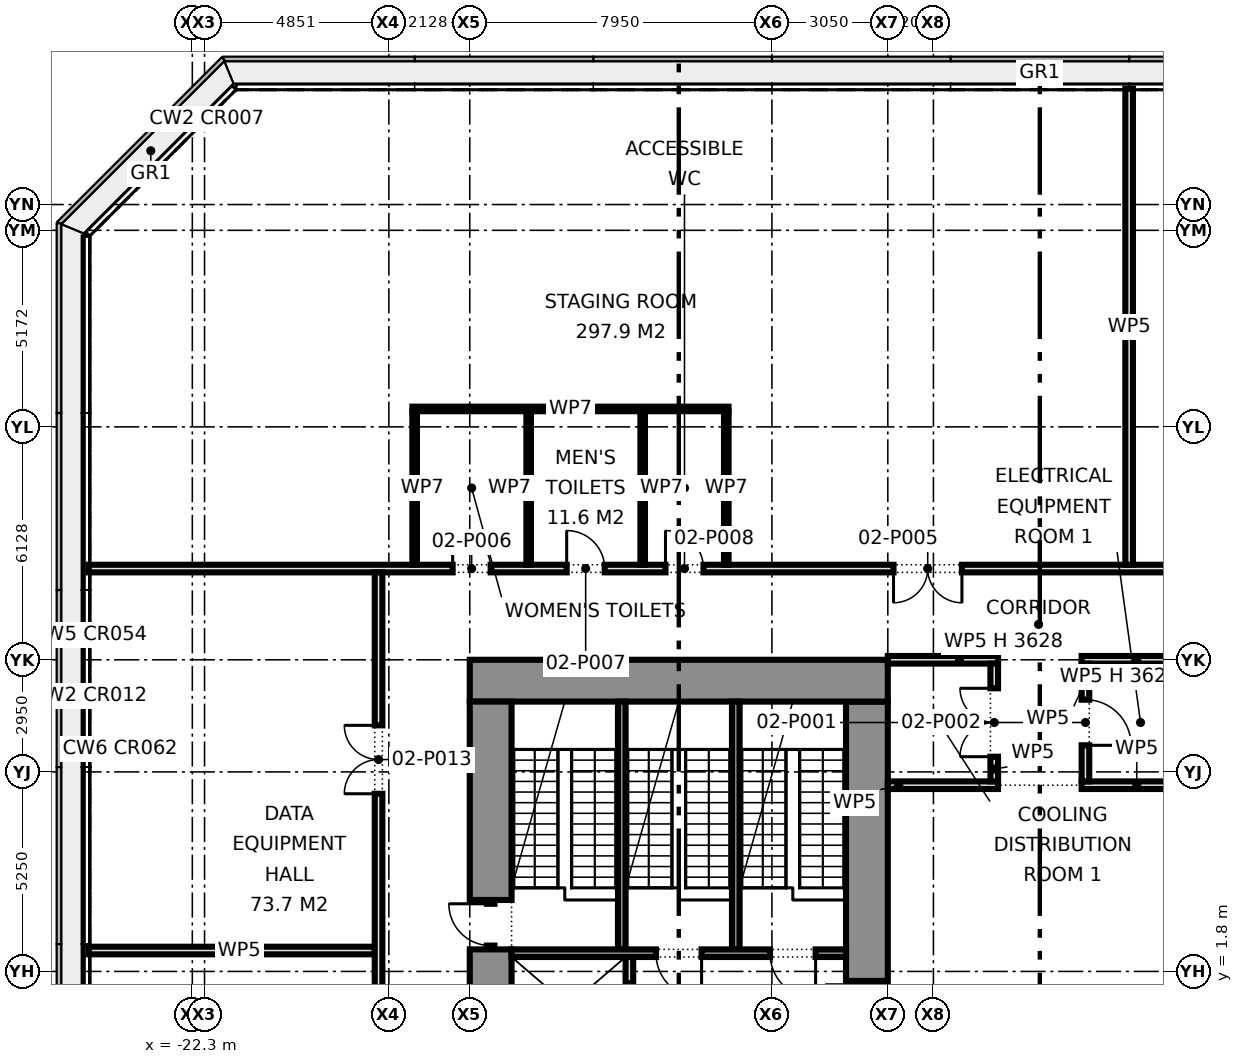
"""IFC4 building model, lengths in metres.
Left out: names, types, materials, properties, quantities, classifications, styles, units other than length and angle.
Written with IfcOpenShell. Run it as: python <this file> out.ifc"""

import sys

from ifc_helpers import new_model, si_unit, direction, frame, frame_2d, origin, place, context, subcontext, project, spatial, rectangle, extrude, element, fill, save


model = new_model("IFC4")
c1 = context("Model", 3, precision=1e-05, world=origin(), true_north=direction((0.0, 1.0)))
c2 = subcontext(c1, "Body", "Model", "MODEL_VIEW")
j1 = project(units=[si_unit("LENGTHUNIT", "METRE"), si_unit("PLANEANGLEUNIT", "RADIAN")], contexts=[c1])
p1 = place(None, origin())
s1 = spatial("IfcSite", under=j1, at=p1, CompositionType="ELEMENT")
p2 = place(p1, origin())
s2 = spatial("IfcBuilding", under=s1, at=p2, CompositionType="ELEMENT")
p3 = place(p2, frame((0.0, 0.0, 6.5)))
s3 = spatial("IfcBuildingStorey", under=s2, at=p3, CompositionType="ELEMENT", Elevation=6.5)
p4 = place(p3, frame((-15.0, 9.45, 0.0), z_axis=(0.0, 0.0, 1.0), x_axis=(1.0, 0.0, 0.0)))
e1 = element("IfcWall", 1, at=p4, inside=s3, PredefinedType="SHEAR", context=c2, shape_type="SweptSolid", body=[
    extrude(rectangle(XDim=11.0, YDim=1.1, at=frame_2d((5.5, 0.0))), origin(), (0.0, 0.0, 1.0), 4.575),
])
p5 = place(p3, frame((-14.45, -3.75, 0.0), z_axis=(0.0, 0.0, 1.0), x_axis=(0.0, 1.0, 0.0)))
e2 = element("IfcWall", 2, at=p5, inside=s3, PredefinedType="SHEAR", context=c2, shape_type="SweptSolid", body=[
    extrude(rectangle(XDim=6.13, YDim=1.1, at=frame_2d((3.065, 0.0))), origin(), (0.0, 0.0, 1.0), 4.575),
])
p6 = place(p3, frame((-14.45, 2.38, 0.0), z_axis=(0.0, 0.0, 1.0), x_axis=(0.0, 1.0, 0.0)))
e3 = element("IfcWall", 3, at=p6, inside=s3, PredefinedType="SHEAR", context=c2, shape_type="SweptSolid", body=[
    extrude(rectangle(XDim=1.3, YDim=0.2, at=frame_2d((0.65, 0.0))), origin(), (0.0, 0.0, 1.0), 2.4),
])
p7 = place(p6, frame((0.1, 0.0, 0.0)))
e4 = element("IfcOpeningElement", 4, at=p7, cuts=e3, PredefinedType="OPENING", context=c2, shape_type="SweptSolid", body=[
    extrude(rectangle(XDim=1.1, YDim=2.1, at=frame_2d((0.55, 1.05))), frame((0.0, 0.11, 0.0), z_axis=(0.0, -1.0, 0.0), x_axis=(1.0, 0.0, 0.0)), (0.0, 0.0, 1.0), 0.22),
])
p8 = place(p3, frame((-14.45, 3.68, 0.0), z_axis=(0.0, 0.0, 1.0), x_axis=(0.0, 1.0, 0.0)))
e5 = element("IfcWall", 5, at=p8, inside=s3, PredefinedType="SHEAR", context=c2, shape_type="SweptSolid", body=[
    extrude(rectangle(XDim=5.22, YDim=1.1, at=frame_2d((2.61, 0.0))), origin(), (0.0, 0.0, 1.0), 4.575),
])
p9 = place(p3, frame((-4.55, 0.25, 0.0), z_axis=(0.0, 0.0, 1.0), x_axis=(0.0, 1.0, 0.0)))
e6 = element("IfcWall", 6, at=p9, inside=s3, PredefinedType="PARTITIONING", context=c2, shape_type="SweptSolid", body=[
    extrude(rectangle(XDim=1.3, YDim=0.2, at=frame_2d((0.65, 0.0))), origin(), (0.0, 0.0, 1.0), 2.4),
])
p10 = place(p9, frame((0.1, 0.0, 0.0)))
e7 = element("IfcOpeningElement", 7, at=p10, cuts=e6, PredefinedType="OPENING", context=c2, shape_type="SweptSolid", body=[
    extrude(rectangle(XDim=1.1, YDim=2.1, at=frame_2d((0.55, 1.05))), frame((0.0, 0.11, 0.0), z_axis=(0.0, -1.0, 0.0), x_axis=(1.0, 0.0, 0.0)), (0.0, 0.0, 1.0), 0.22),
])
p11 = place(p3, frame((-4.55, 1.55, 0.0), z_axis=(0.0, 0.0, 1.0), x_axis=(0.0, 1.0, 0.0)))
e8 = element("IfcWall", 8, at=p11, inside=s3, PredefinedType="SHEAR", context=c2, shape_type="SweptSolid", body=[
    extrude(rectangle(XDim=7.35, YDim=1.1, at=frame_2d((3.675, 0.0))), origin(), (0.0, 0.0, 1.0), 4.575),
])
p12 = place(p3, frame((-10.8, -0.4, 0.0), z_axis=(0.0, 0.0, 1.0), x_axis=(0.0, 1.0, 0.0)))
e9 = element("IfcWall", 9, at=p12, inside=s3, PredefinedType="PARTITIONING", context=c2, shape_type="SweptSolid", body=[
    extrude(rectangle(XDim=2.58, YDim=0.2, at=frame_2d((1.29, 0.0))), origin(), (0.0, 0.0, 1.0), 4.575),
])
p13 = place(p12, frame((0.69, 0.0, 0.0)))
e10 = element("IfcOpeningElement", 10, at=p13, cuts=e9, PredefinedType="OPENING", context=c2, shape_type="SweptSolid", body=[
    extrude(rectangle(XDim=1.2, YDim=2.1, at=frame_2d((0.6, 1.05))), frame((0.0, 0.11, 0.0), z_axis=(0.0, -1.0, 0.0), x_axis=(1.0, 0.0, 0.0)), (0.0, 0.0, 1.0), 0.22),
])
p14 = place(p3, frame((-13.9, 2.28, 0.0), z_axis=(0.0, 0.0, 1.0), x_axis=(1.0, 0.0, 0.0)))
e11 = element("IfcWall", 11, at=p14, inside=s3, PredefinedType="SHEAR", context=c2, shape_type="SweptSolid", body=[
    extrude(rectangle(XDim=8.8, YDim=0.2, at=frame_2d((4.4, 0.0))), origin(), (0.0, 0.0, 1.0), 4.575),
])
p15 = place(p14, frame((3.8, 0.0, 0.0)))
e12 = element("IfcOpeningElement", 12, at=p15, cuts=e11, PredefinedType="OPENING", context=c2, shape_type="SweptSolid", body=[
    extrude(rectangle(XDim=1.2, YDim=2.1, at=frame_2d((0.6, 1.05))), frame((0.0, 0.11, 0.0), z_axis=(0.0, -1.0, 0.0), x_axis=(1.0, 0.0, 0.0)), (0.0, 0.0, 1.0), 0.22),
])
p16 = place(p14, frame((6.8, 0.0, 0.0)))
e13 = element("IfcOpeningElement", 13, at=p16, cuts=e11, PredefinedType="OPENING", context=c2, shape_type="SweptSolid", body=[
    extrude(rectangle(XDim=1.2, YDim=2.1, at=frame_2d((0.6, 1.05))), frame((0.0, 0.11, 0.0), z_axis=(0.0, -1.0, 0.0), x_axis=(1.0, 0.0, 0.0)), (0.0, 0.0, 1.0), 0.22),
])
for number, where, z_axis, x_axis in (
    (14, (-11.0, 2.38, 0.0), (0.0, 0.0, 1.0), (0.0, 1.0, 0.0)),
    (15, (-8.0, 2.38, 0.0), (0.0, 0.0, 1.0), (0.0, 1.0, 0.0)),
):
    element("IfcWall", number, at=place(p3, frame(where, z_axis=z_axis, x_axis=x_axis)), inside=s3, PredefinedType="SHEAR", context=c2, shape_type="SweptSolid", body=[
        extrude(rectangle(XDim=6.52, YDim=0.2, at=frame_2d((3.26, 0.0))), origin(), (0.0, 0.0, 1.0), 4.575),
    ])
p17 = place(p3, frame((-25.03, 2.35, 0.0), z_axis=(0.0, 0.0, 1.0), x_axis=(1.0, 0.0, 0.0)))
e16 = element("IfcWall", 16, at=p17, inside=s3, PredefinedType="PARTITIONING", context=c2, shape_type="SweptSolid", body=[
    extrude(rectangle(XDim=7.53, YDim=0.2, at=frame_2d((3.765, 0.0))), origin(), (0.0, 0.0, 1.0), 4.575),
])
for number, where, z_axis, x_axis in (
    (17, (-4.0, 6.7, 0.0), (0.0, 0.0, 1.0), (1.0, 0.0, 0.0)),
    (18, (1.1, 6.7, 0.0), (0.0, 0.0, 1.0), (1.0, 0.0, 0.0)),
):
    element("IfcWall", number, at=place(p3, frame(where, z_axis=z_axis, x_axis=x_axis)), inside=s3, PredefinedType="PARTITIONING", context=c2, shape_type="SweptSolid", body=[
        extrude(rectangle(XDim=2.9, YDim=0.2, at=frame_2d((1.45, 0.0))), origin(), (0.0, 0.0, 1.0), 4.575),
    ])
for number, where, z_axis, x_axis in (
    (19, (-4.0, 10.0, 0.0), (0.0, 0.0, 1.0), (1.0, 0.0, 0.0)),
    (20, (1.1, 10.0, 0.0), (0.0, 0.0, 1.0), (1.0, 0.0, 0.0)),
):
    element("IfcWall", number, at=place(p3, frame(where, z_axis=z_axis, x_axis=x_axis)), inside=s3, PredefinedType="PARTITIONING", context=c2, shape_type="SweptSolid", body=[
        extrude(rectangle(XDim=2.9, YDim=0.2, at=frame_2d((1.45, 0.0))), origin(), (0.0, 0.0, 1.0), 3.628),
    ])
p18 = place(p3, frame((-25.03, 12.4, 0.0), z_axis=(0.0, 0.0, 1.0), x_axis=(1.0, 0.0, 0.0)))
e21 = element("IfcWall", 21, at=p18, inside=s3, PredefinedType="PARTITIONING", context=c2, shape_type="SweptSolid", body=[
    extrude(rectangle(XDim=50.06, YDim=0.2, at=frame_2d((25.03, 0.0))), origin(), (0.0, 0.0, 1.0), 4.575),
])
p19 = place(p18, frame((21.18, 0.0, 0.0)))
e22 = element("IfcOpeningElement", 22, at=p19, cuts=e21, PredefinedType="OPENING", context=c2, shape_type="SweptSolid", body=[
    extrude(rectangle(XDim=1.8, YDim=2.1, at=frame_2d((0.9, 1.05))), frame((0.0, 0.11, 0.0), z_axis=(0.0, -1.0, 0.0), x_axis=(1.0, 0.0, 0.0)), (0.0, 0.0, 1.0), 0.22),
])
p20 = place(p18, frame((9.58, 0.0, 0.0)))
e23 = element("IfcOpeningElement", 23, at=p20, cuts=e21, PredefinedType="OPENING", context=c2, shape_type="SweptSolid", body=[
    extrude(rectangle(XDim=1.0, YDim=2.1, at=frame_2d((0.5, 1.05))), frame((0.0, 0.11, 0.0), z_axis=(0.0, -1.0, 0.0), x_axis=(1.0, 0.0, 0.0)), (0.0, 0.0, 1.0), 0.22),
])
p21 = place(p18, frame((12.58, 0.0, 0.0)))
e24 = element("IfcOpeningElement", 24, at=p21, cuts=e21, PredefinedType="OPENING", context=c2, shape_type="SweptSolid", body=[
    extrude(rectangle(XDim=1.0, YDim=2.1, at=frame_2d((0.5, 1.05))), frame((0.0, 0.11, 0.0), z_axis=(0.0, -1.0, 0.0), x_axis=(1.0, 0.0, 0.0)), (0.0, 0.0, 1.0), 0.22),
])
p22 = place(p18, frame((15.18, 0.0, 0.0)))
e25 = element("IfcOpeningElement", 25, at=p22, cuts=e21, PredefinedType="OPENING", context=c2, shape_type="SweptSolid", body=[
    extrude(rectangle(XDim=1.0, YDim=2.1, at=frame_2d((0.5, 1.05))), frame((0.0, 0.11, 0.0), z_axis=(0.0, -1.0, 0.0), x_axis=(1.0, 0.0, 0.0)), (0.0, 0.0, 1.0), 0.22),
])
p23 = place(p18, frame((34.01, 0.0, 0.0)))
e26 = element("IfcOpeningElement", 26, at=p23, cuts=e21, PredefinedType="OPENING", context=c2, shape_type="SweptSolid", body=[
    extrude(rectangle(XDim=1.8, YDim=2.1, at=frame_2d((0.9, 1.05))), frame((0.0, 0.11, 0.0), z_axis=(0.0, -1.0, 0.0), x_axis=(1.0, 0.0, 0.0)), (0.0, 0.0, 1.0), 0.22),
])
p24 = place(p3, frame((2.35, 12.5, 0.0), z_axis=(0.0, 0.0, 1.0), x_axis=(0.0, 1.0, 0.0)))
e27 = element("IfcWall", 27, at=p24, inside=s3, PredefinedType="PARTITIONING", context=c2, shape_type="SweptSolid", body=[
    extrude(rectangle(XDim=12.53, YDim=0.2, at=frame_2d((6.265, 0.0))), origin(), (0.0, 0.0, 1.0), 4.575),
])
p25 = place(p3, frame((1.2, 6.8, 0.0), z_axis=(0.0, 0.0, 1.0), x_axis=(0.0, 1.0, 0.0)))
e28 = element("IfcWall", 28, at=p25, inside=s3, PredefinedType="PARTITIONING", context=c2, shape_type="SweptSolid", body=[
    extrude(rectangle(XDim=3.1, YDim=0.2, at=frame_2d((1.55, 0.0))), origin(), (0.0, 0.0, 1.0), 4.575),
])
p26 = place(p25, frame((0.95, 0.0, 0.0)))
e29 = element("IfcOpeningElement", 29, at=p26, cuts=e28, PredefinedType="OPENING", context=c2, shape_type="SweptSolid", body=[
    extrude(rectangle(XDim=1.2, YDim=2.1, at=frame_2d((0.6, 1.05))), frame((0.0, 0.11, 0.0), z_axis=(0.0, -1.0, 0.0), x_axis=(1.0, 0.0, 0.0)), (0.0, 0.0, 1.0), 0.22),
])
p27 = place(p3, frame((-1.2, 6.8, 0.0), z_axis=(0.0, 0.0, 1.0), x_axis=(0.0, 1.0, 0.0)))
e30 = element("IfcWall", 30, at=p27, inside=s3, PredefinedType="PARTITIONING", context=c2, shape_type="SweptSolid", body=[
    extrude(rectangle(XDim=3.1, YDim=0.2, at=frame_2d((1.55, 0.0))), origin(), (0.0, 0.0, 1.0), 4.575),
])
p28 = place(p27, frame((0.65, 0.0, 0.0)))
e31 = element("IfcOpeningElement", 31, at=p28, cuts=e30, PredefinedType="OPENING", context=c2, shape_type="SweptSolid", body=[
    extrude(rectangle(XDim=1.8, YDim=2.1, at=frame_2d((0.9, 1.05))), frame((0.0, 0.11, 0.0), z_axis=(0.0, -1.0, 0.0), x_axis=(1.0, 0.0, 0.0)), (0.0, 0.0, 1.0), 0.22),
])
p29 = place(p3, frame((-17.4, -12.3, 0.0), z_axis=(0.0, 0.0, 1.0), x_axis=(0.0, 1.0, 0.0)))
e32 = element("IfcWall", 32, at=p29, inside=s3, PredefinedType="PARTITIONING", context=c2, shape_type="SweptSolid", body=[
    extrude(rectangle(XDim=24.6, YDim=0.2, at=frame_2d((12.3, 0.0))), origin(), (0.0, 0.0, 1.0), 4.575),
])
p30 = place(p29, frame((6.675, 0.0, 0.0)))
e33 = element("IfcOpeningElement", 33, at=p30, cuts=e32, PredefinedType="OPENING", context=c2, shape_type="SweptSolid", body=[
    extrude(rectangle(XDim=1.2, YDim=2.1, at=frame_2d((0.6, 1.05))), frame((0.0, 0.11, 0.0), z_axis=(0.0, -1.0, 0.0), x_axis=(1.0, 0.0, 0.0)), (0.0, 0.0, 1.0), 0.22),
])
p31 = place(p29, frame((18.775, 0.0, 0.0)))
e34 = element("IfcOpeningElement", 34, at=p31, cuts=e32, PredefinedType="OPENING", context=c2, shape_type="SweptSolid", body=[
    extrude(rectangle(XDim=1.8, YDim=2.1, at=frame_2d((0.9, 1.05))), frame((0.0, 0.11, 0.0), z_axis=(0.0, -1.0, 0.0), x_axis=(1.0, 0.0, 0.0)), (0.0, 0.0, 1.0), 0.22),
])
p32 = place(p3, frame((-16.509, 16.6, 0.0), z_axis=(0.0, 0.0, 1.0), x_axis=(1.0, 0.0, 0.0)))
e35 = element("IfcWall", 35, at=p32, inside=s3, PredefinedType="PARTITIONING", context=c2, shape_type="SweptSolid", body=[
    extrude(rectangle(XDim=8.318, YDim=0.12, at=frame_2d((4.159, 0.0))), origin(), (0.0, 0.0, 1.0), 4.575),
])
p33 = place(p3, frame((-8.25, 12.5, 0.0), z_axis=(0.0, 0.0, 1.0), x_axis=(0.0, 1.0, 0.0)))
e36 = element("IfcWall", 36, at=p33, inside=s3, PredefinedType="PARTITIONING", context=c2, shape_type="SweptSolid", body=[
    extrude(rectangle(XDim=4.039, YDim=0.12, at=frame_2d((2.02, 0.0))), origin(), (0.0, 0.0, 1.0), 4.575),
])
for number, where, z_axis, x_axis in (
    (37, (-10.45, 12.5, 0.0), (0.0, 0.0, 1.0), (0.0, 1.0, 0.0)),
    (38, (-13.45, 12.5, 0.0), (0.0, 0.0, 1.0), (0.0, 1.0, 0.0)),
):
    element("IfcWall", number, at=place(p3, frame(where, z_axis=z_axis, x_axis=x_axis)), inside=s3, PredefinedType="PARTITIONING", context=c2, shape_type="SweptSolid", body=[
        extrude(rectangle(XDim=4.04, YDim=0.12, at=frame_2d((2.02, 0.0))), origin(), (0.0, 0.0, 1.0), 4.575),
    ])
p34 = place(p3, frame((-16.45, 12.5, 0.0), z_axis=(0.0, 0.0, 1.0), x_axis=(0.0, 1.0, 0.0)))
e39 = element("IfcWall", 39, at=p34, inside=s3, PredefinedType="PARTITIONING", context=c2, shape_type="SweptSolid", body=[
    extrude(rectangle(XDim=4.039, YDim=0.12, at=frame_2d((2.02, 0.0))), origin(), (0.0, 0.0, 1.0), 4.575),
])
p35 = place(p7, origin())
e40 = element("IfcDoor", 40, at=p35, inside=s3, OperationType="SINGLE_SWING_RIGHT", PredefinedType="DOOR", context=c2, shape_type="SweptSolid", body=[
    extrude(rectangle(XDim=1.1, YDim=2.1, at=frame_2d((0.55, 1.05))), frame((0.0, 0.025, 0.0), z_axis=(0.0, -1.0, 0.0), x_axis=(1.0, 0.0, 0.0)), (0.0, 0.0, 1.0), 0.05),
])
fill(e4, e40)
p36 = place(p10, origin())
e41 = element("IfcDoor", 41, at=p36, inside=s3, OperationType="SINGLE_SWING_RIGHT", PredefinedType="DOOR", context=c2, shape_type="SweptSolid", body=[
    extrude(rectangle(XDim=1.1, YDim=2.1, at=frame_2d((0.55, 1.05))), frame((0.0, 0.025, 0.0), z_axis=(0.0, -1.0, 0.0), x_axis=(1.0, 0.0, 0.0)), (0.0, 0.0, 1.0), 0.05),
])
fill(e7, e41)
p37 = place(p13, origin())
e42 = element("IfcDoor", 42, at=p37, inside=s3, OperationType="DOUBLE_DOOR_SLIDING", PredefinedType="DOOR", context=c2, shape_type="SweptSolid", body=[
    extrude(rectangle(XDim=1.2, YDim=2.1, at=frame_2d((0.6, 1.05))), frame((0.0, 0.025, 0.0), z_axis=(0.0, -1.0, 0.0), x_axis=(1.0, 0.0, 0.0)), (0.0, 0.0, 1.0), 0.05),
])
fill(e10, e42)
p38 = place(p15, frame((1.2, 0.0, 0.0), z_axis=(0.0, 0.0, 1.0), x_axis=(-1.0, 0.0, 0.0)))
e43 = element("IfcDoor", 43, at=p38, inside=s3, OperationType="SINGLE_SWING_LEFT", PredefinedType="DOOR", context=c2, shape_type="SweptSolid", body=[
    extrude(rectangle(XDim=1.2, YDim=2.1, at=frame_2d((0.6, 1.05))), frame((0.0, 0.025, 0.0), z_axis=(0.0, -1.0, 0.0), x_axis=(1.0, 0.0, 0.0)), (0.0, 0.0, 1.0), 0.05),
])
fill(e12, e43)
p39 = place(p16, frame((1.2, 0.0, 0.0), z_axis=(0.0, 0.0, 1.0), x_axis=(-1.0, 0.0, 0.0)))
e44 = element("IfcDoor", 44, at=p39, inside=s3, OperationType="SINGLE_SWING_LEFT", PredefinedType="DOOR", context=c2, shape_type="SweptSolid", body=[
    extrude(rectangle(XDim=1.2, YDim=2.1, at=frame_2d((0.6, 1.05))), frame((0.0, 0.025, 0.0), z_axis=(0.0, -1.0, 0.0), x_axis=(1.0, 0.0, 0.0)), (0.0, 0.0, 1.0), 0.05),
])
fill(e13, e44)
p40 = place(p28, origin())
e45 = element("IfcDoor", 45, at=p40, inside=s3, OperationType="DOUBLE_DOOR_SINGLE_SWING", PredefinedType="DOOR", context=c2, shape_type="SweptSolid", body=[
    extrude(rectangle(XDim=1.8, YDim=2.1, at=frame_2d((0.9, 1.05))), frame((0.0, 0.025, 0.0), z_axis=(0.0, -1.0, 0.0), x_axis=(1.0, 0.0, 0.0)), (0.0, 0.0, 1.0), 0.05),
])
fill(e31, e45)
p41 = place(p26, frame((1.2, 0.0, 0.0), z_axis=(0.0, 0.0, 1.0), x_axis=(-1.0, 0.0, 0.0)))
e46 = element("IfcDoor", 46, at=p41, inside=s3, OperationType="SINGLE_SWING_RIGHT", PredefinedType="DOOR", context=c2, shape_type="SweptSolid", body=[
    extrude(rectangle(XDim=1.2, YDim=2.1, at=frame_2d((0.6, 1.05))), frame((0.0, 0.025, 0.0), z_axis=(0.0, -1.0, 0.0), x_axis=(1.0, 0.0, 0.0)), (0.0, 0.0, 1.0), 0.05),
])
fill(e29, e46)
p42 = place(p19, frame((1.8, 0.0, 0.0), z_axis=(0.0, 0.0, 1.0), x_axis=(-1.0, 0.0, 0.0)))
e47 = element("IfcDoor", 47, at=p42, inside=s3, OperationType="DOUBLE_DOOR_SINGLE_SWING", PredefinedType="DOOR", context=c2, shape_type="SweptSolid", body=[
    extrude(rectangle(XDim=1.8, YDim=2.1, at=frame_2d((0.9, 1.05))), frame((0.0, 0.025, 0.0), z_axis=(0.0, -1.0, 0.0), x_axis=(1.0, 0.0, 0.0)), (0.0, 0.0, 1.0), 0.05),
])
fill(e22, e47)
p43 = place(p20, origin())
e48 = element("IfcDoor", 48, at=p43, inside=s3, OperationType="SINGLE_SWING_LEFT", PredefinedType="DOOR", context=c2, shape_type="SweptSolid", body=[
    extrude(rectangle(XDim=1.0, YDim=2.1, at=frame_2d((0.5, 1.05))), frame((0.0, 0.025, 0.0), z_axis=(0.0, -1.0, 0.0), x_axis=(1.0, 0.0, 0.0)), (0.0, 0.0, 1.0), 0.05),
])
fill(e23, e48)
p44 = place(p21, origin())
e49 = element("IfcDoor", 49, at=p44, inside=s3, OperationType="SINGLE_SWING_LEFT", PredefinedType="DOOR", context=c2, shape_type="SweptSolid", body=[
    extrude(rectangle(XDim=1.0, YDim=2.1, at=frame_2d((0.5, 1.05))), frame((0.0, 0.025, 0.0), z_axis=(0.0, -1.0, 0.0), x_axis=(1.0, 0.0, 0.0)), (0.0, 0.0, 1.0), 0.05),
])
fill(e24, e49)
p45 = place(p22, origin())
e50 = element("IfcDoor", 50, at=p45, inside=s3, OperationType="SINGLE_SWING_LEFT", PredefinedType="DOOR", context=c2, shape_type="SweptSolid", body=[
    extrude(rectangle(XDim=1.0, YDim=2.1, at=frame_2d((0.5, 1.05))), frame((0.0, 0.025, 0.0), z_axis=(0.0, -1.0, 0.0), x_axis=(1.0, 0.0, 0.0)), (0.0, 0.0, 1.0), 0.05),
])
fill(e25, e50)
p46 = place(p31, origin())
e51 = element("IfcDoor", 51, at=p46, inside=s3, OperationType="DOUBLE_DOOR_SINGLE_SWING", PredefinedType="DOOR", context=c2, shape_type="SweptSolid", body=[
    extrude(rectangle(XDim=1.8, YDim=2.1, at=frame_2d((0.9, 1.05))), frame((0.0, 0.025, 0.0), z_axis=(0.0, -1.0, 0.0), x_axis=(1.0, 0.0, 0.0)), (0.0, 0.0, 1.0), 0.05),
])
fill(e34, e51)
save(model, sys.argv[1])
